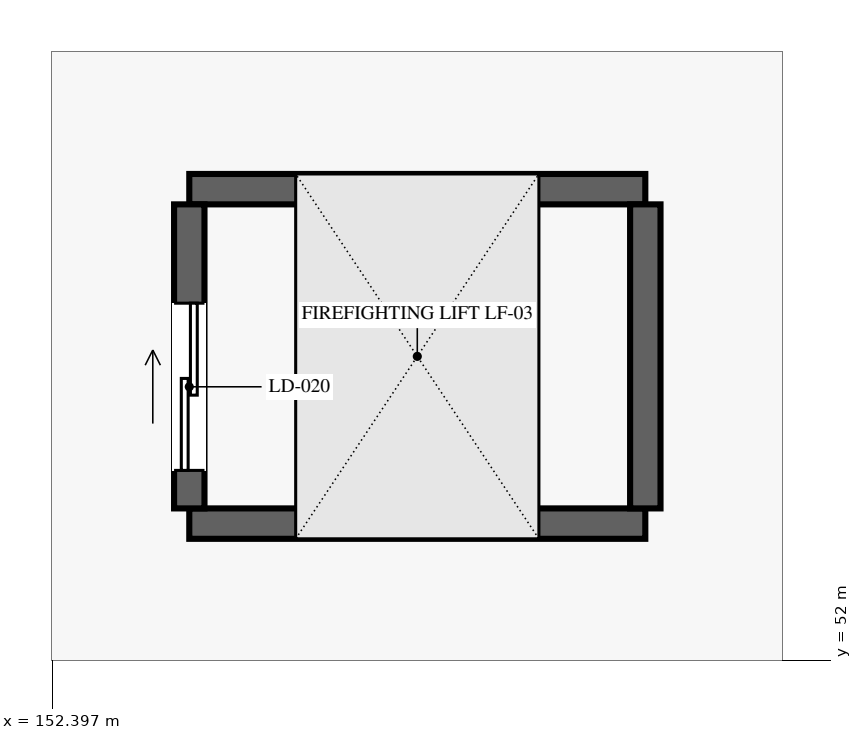
"""IFC4 building model, lengths in metres.
Left out: names, types, materials, properties, quantities, classifications, styles, units other than length and angle.
Written with IfcOpenShell. Run it as: python <this file> out.ifc"""

import sys

from ifc_helpers import new_model, si_unit, direction, frame, frame_2d, origin, place, context, subcontext, project, spatial, rectangle, extrude, element, fill, save


model = new_model("IFC4")
c1 = context("Model", 3, precision=1e-05, world=origin(), true_north=direction((0.0, 1.0)))
c2 = subcontext(c1, "Body", "Model", "MODEL_VIEW")
j1 = project(units=[si_unit("LENGTHUNIT", "METRE"), si_unit("PLANEANGLEUNIT", "RADIAN")], contexts=[c1])
p1 = place(None, origin())
s1 = spatial("IfcSite", under=j1, at=p1, CompositionType="ELEMENT")
p2 = place(p1, origin())
s2 = spatial("IfcBuilding", under=s1, at=p2, CompositionType="ELEMENT")
p3 = place(p2, origin())
s3 = spatial("IfcBuildingStorey", under=s2, at=p3, CompositionType="ELEMENT", Elevation=0.0)
for number, where, z_axis, x_axis in (
    (1, (153.3, 52.9, 0.0), (0.0, 0.0, 1.0), (1.0, 0.0, 0.0)),
    (2, (153.3, 55.1, 0.0), (0.0, 0.0, 1.0), (1.0, 0.0, 0.0)),
):
    element("IfcWall", number, at=place(p3, frame(where, z_axis=z_axis, x_axis=x_axis)), inside=s3, PredefinedType="SHEAR", context=c2, shape_type="SweptSolid", body=[
        extrude(rectangle(XDim=3.0, YDim=0.2, at=frame_2d((1.5, 0.0))), origin(), (0.0, 0.0, 1.0), 5.16),
    ])
p4 = place(p3, frame((153.3, 53.0, 0.0), z_axis=(0.0, 0.0, 1.0), x_axis=(0.0, 1.0, 0.0)))
e3 = element("IfcWall", 3, at=p4, inside=s3, PredefinedType="SHEAR", context=c2, shape_type="SweptSolid", body=[
    extrude(rectangle(XDim=2.0, YDim=0.2, at=frame_2d((1.0, 0.0))), origin(), (0.0, 0.0, 1.0), 5.16),
])
p5 = place(p4, frame((0.25, 0.0, 0.0)))
e4 = element("IfcOpeningElement", 4, at=p5, cuts=e3, PredefinedType="OPENING", context=c2, shape_type="SweptSolid", body=[
    extrude(rectangle(XDim=1.1, YDim=2.15, at=frame_2d((0.55, 1.075))), frame((0.0, 0.11, 0.0), z_axis=(0.0, -1.0, 0.0), x_axis=(1.0, 0.0, 0.0)), (0.0, 0.0, 1.0), 0.22),
])
p6 = place(p3, frame((156.3, 53.0, 0.0), z_axis=(0.0, 0.0, 1.0), x_axis=(0.0, 1.0, 0.0)))
e5 = element("IfcWall", 5, at=p6, inside=s3, PredefinedType="SHEAR", context=c2, shape_type="SweptSolid", body=[
    extrude(rectangle(XDim=2.0, YDim=0.2, at=frame_2d((1.0, 0.0))), origin(), (0.0, 0.0, 1.0), 5.16),
])
p7 = place(p5, origin())
e6 = element("IfcDoor", 6, at=p7, inside=s3, OperationType="DOUBLE_DOOR_SLIDING", PredefinedType="DOOR", context=c2, shape_type="SweptSolid", body=[
    extrude(rectangle(XDim=1.1, YDim=2.15, at=frame_2d((0.55, 1.075))), frame((0.0, 0.025, 0.0), z_axis=(0.0, -1.0, 0.0), x_axis=(1.0, 0.0, 0.0)), (0.0, 0.0, 1.0), 0.05),
])
fill(e4, e6)
save(model, sys.argv[1])
